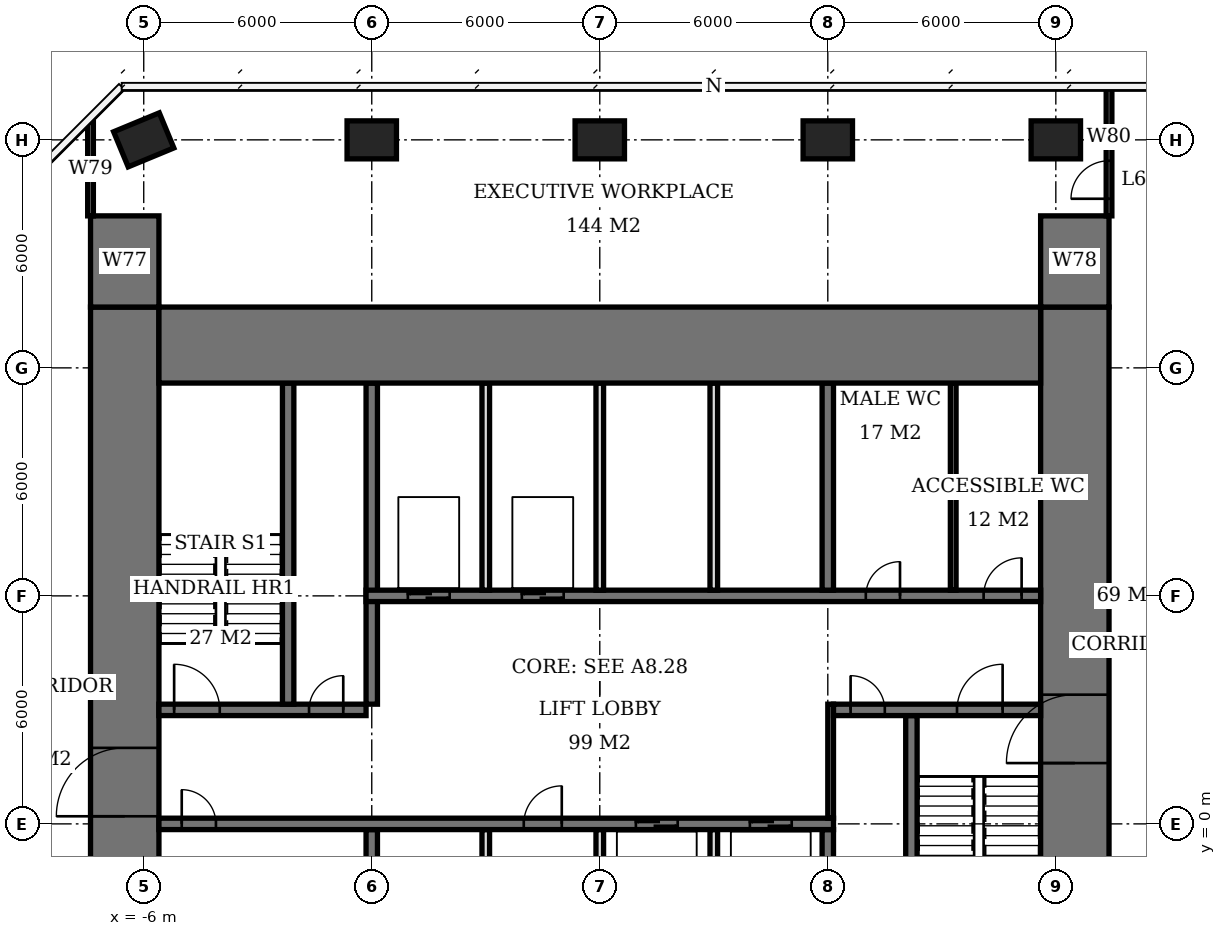
"""IFC4 building model, lengths in metres.
Left out: names, types, materials, properties, quantities, classifications, styles, units other than length and angle.
Written with IfcOpenShell. Run it as: python <this file> out.ifc"""

import sys

from ifc_helpers import new_model, si_unit, direction, frame, frame_2d, origin, origin_2d, place, context, subcontext, project, spatial, rectangle, extrude, element, fill, save


model = new_model("IFC4")
c1 = context("Model", 3, precision=1e-05, world=origin(), true_north=direction((0.0, 1.0)))
c2 = subcontext(c1, "Body", "Model", "MODEL_VIEW")
j1 = project(units=[si_unit("LENGTHUNIT", "METRE"), si_unit("PLANEANGLEUNIT", "RADIAN")], contexts=[c1])
p1 = place(None, origin())
s1 = spatial("IfcSite", under=j1, at=p1, CompositionType="ELEMENT")
p2 = place(p1, origin())
s2 = spatial("IfcBuilding", under=s1, at=p2, CompositionType="ELEMENT")
p3 = place(p2, frame((0.0, 0.0, 272.3)))
s3 = spatial("IfcBuildingStorey", under=s2, at=p3, CompositionType="ELEMENT", Elevation=272.3)
for number, where, z_axis, x_axis in (
    (1, (-6.0, 18.0, 0.0), (0.0, 0.0, 1.0), (0.924, 0.383, 0.0)),
    (2, (0.0, 18.0, 0.0), (0.0, 0.0, 1.0), (1.0, 0.0, 0.0)),
    (3, (6.0, 18.0, 0.0), (0.0, 0.0, 1.0), (1.0, 0.0, 0.0)),
    (4, (12.0, 18.0, 0.0), (0.0, 0.0, 1.0), (1.0, 0.0, 0.0)),
    (5, (18.0, 18.0, 0.0), (0.0, 0.0, 1.0), (1.0, 0.0, 0.0)),
):
    element("IfcColumn", number, at=place(p3, frame(where, z_axis=z_axis, x_axis=x_axis)), inside=s3, PredefinedType="COLUMN", context=c2, shape_type="SweptSolid", body=[
        extrude(rectangle(XDim=1.3, YDim=1.0, at=origin_2d()), origin(), (0.0, 0.0, 1.0), 3.9),
    ])
p4 = place(p3, frame((-5.6, 12.6, 0.0), z_axis=(0.0, 0.0, 1.0), x_axis=(1.0, 0.0, 0.0)))
e6 = element("IfcWall", 6, at=p4, inside=s3, PredefinedType="SHEAR", context=c2, shape_type="SweptSolid", body=[
    extrude(rectangle(XDim=23.2, YDim=2.0, at=frame_2d((11.6, 0.0))), origin(), (0.0, 0.0, 1.0), 3.9),
])
p5 = place(p3, frame((-6.5, -7.6, 0.0), z_axis=(0.0, 0.0, 1.0), x_axis=(0.0, 1.0, 0.0)))
e7 = element("IfcWall", 7, at=p5, inside=s3, PredefinedType="SHEAR", context=c2, shape_type="SweptSolid", body=[
    extrude(rectangle(XDim=21.2, YDim=1.8, at=frame_2d((10.6, 0.0))), origin(), (0.0, 0.0, 1.0), 3.9),
])
p6 = place(p5, frame((7.8, 0.0, 0.0)))
e8 = element("IfcOpeningElement", 8, at=p6, cuts=e7, PredefinedType="OPENING", context=c2, shape_type="SweptSolid", body=[
    extrude(rectangle(XDim=1.8, YDim=2.4, at=frame_2d((0.9, 1.2))), frame((0.0, 0.91, 0.0), z_axis=(0.0, -1.0, 0.0), x_axis=(1.0, 0.0, 0.0)), (0.0, 0.0, 1.0), 1.82),
])
p7 = place(p3, frame((18.5, -7.6, 0.0), z_axis=(0.0, 0.0, 1.0), x_axis=(0.0, 1.0, 0.0)))
e9 = element("IfcWall", 9, at=p7, inside=s3, PredefinedType="SHEAR", context=c2, shape_type="SweptSolid", body=[
    extrude(rectangle(XDim=21.2, YDim=1.8, at=frame_2d((10.6, 0.0))), origin(), (0.0, 0.0, 1.0), 3.9),
])
p8 = place(p7, frame((9.2, 0.0, 0.0)))
e10 = element("IfcOpeningElement", 10, at=p8, cuts=e9, PredefinedType="OPENING", context=c2, shape_type="SweptSolid", body=[
    extrude(rectangle(XDim=1.8, YDim=2.4, at=frame_2d((0.9, 1.2))), frame((0.0, 0.91, 0.0), z_axis=(0.0, -1.0, 0.0), x_axis=(1.0, 0.0, 0.0)), (0.0, 0.0, 1.0), 1.82),
])
for number, where, z_axis, x_axis in (
    (11, (-6.5, 13.6, 0.0), (0.0, 0.0, 1.0), (0.0, 1.0, 0.0)),
    (12, (18.5, 13.6, 0.0), (0.0, 0.0, 1.0), (0.0, 1.0, 0.0)),
):
    element("IfcWall", number, at=place(p3, frame(where, z_axis=z_axis, x_axis=x_axis)), inside=s3, PredefinedType="SHEAR", context=c2, shape_type="SweptSolid", body=[
        extrude(rectangle(XDim=2.4, YDim=1.8, at=frame_2d((1.2, 0.0))), origin(), (0.0, 0.0, 1.0), 3.9),
    ])
p9 = place(p3, frame((-5.6, 0.0, 0.0), z_axis=(0.0, 0.0, 1.0), x_axis=(1.0, 0.0, 0.0)))
e13 = element("IfcWall", 13, at=p9, inside=s3, PredefinedType="SHEAR", context=c2, shape_type="SweptSolid", body=[
    extrude(rectangle(XDim=17.75, YDim=0.3, at=frame_2d((8.875, 0.0))), origin(), (0.0, 0.0, 1.0), 3.9),
])
p10 = place(p9, frame((0.6, 0.0, 0.0)))
e14 = element("IfcOpeningElement", 14, at=p10, cuts=e13, PredefinedType="OPENING", context=c2, shape_type="SweptSolid", body=[
    extrude(rectangle(XDim=0.9, YDim=2.1, at=frame_2d((0.45, 1.05))), frame((0.0, 0.16, 0.0), z_axis=(0.0, -1.0, 0.0), x_axis=(1.0, 0.0, 0.0)), (0.0, 0.0, 1.0), 0.32),
])
p11 = place(p9, frame((9.6, 0.0, 0.0)))
e15 = element("IfcOpeningElement", 15, at=p11, cuts=e13, PredefinedType="OPENING", context=c2, shape_type="SweptSolid", body=[
    extrude(rectangle(XDim=1.0, YDim=2.1, at=frame_2d((0.5, 1.05))), frame((0.0, 0.16, 0.0), z_axis=(0.0, -1.0, 0.0), x_axis=(1.0, 0.0, 0.0)), (0.0, 0.0, 1.0), 0.32),
])
p12 = place(p9, frame((12.55, 0.0, 0.0)))
e16 = element("IfcOpeningElement", 16, at=p12, cuts=e13, PredefinedType="OPENING", context=c2, shape_type="SweptSolid", body=[
    extrude(rectangle(XDim=1.1, YDim=2.1, at=frame_2d((0.55, 1.05))), frame((0.0, 0.16, 0.0), z_axis=(0.0, -1.0, 0.0), x_axis=(1.0, 0.0, 0.0)), (0.0, 0.0, 1.0), 0.32),
])
p13 = place(p9, frame((15.55, 0.0, 0.0)))
e17 = element("IfcOpeningElement", 17, at=p13, cuts=e13, PredefinedType="OPENING", context=c2, shape_type="SweptSolid", body=[
    extrude(rectangle(XDim=1.1, YDim=2.1, at=frame_2d((0.55, 1.05))), frame((0.0, 0.16, 0.0), z_axis=(0.0, -1.0, 0.0), x_axis=(1.0, 0.0, 0.0)), (0.0, 0.0, 1.0), 0.32),
])
p14 = place(p3, frame((-5.6, 3.0, 0.0), z_axis=(0.0, 0.0, 1.0), x_axis=(1.0, 0.0, 0.0)))
e18 = element("IfcWall", 18, at=p14, inside=s3, PredefinedType="SHEAR", context=c2, shape_type="SweptSolid", body=[
    extrude(rectangle(XDim=5.45, YDim=0.3, at=frame_2d((2.725, 0.0))), origin(), (0.0, 0.0, 1.0), 3.9),
])
p15 = place(p14, frame((0.4, 0.0, 0.0)))
e19 = element("IfcOpeningElement", 19, at=p15, cuts=e18, PredefinedType="OPENING", context=c2, shape_type="SweptSolid", body=[
    extrude(rectangle(XDim=1.2, YDim=2.1, at=frame_2d((0.6, 1.05))), frame((0.0, 0.16, 0.0), z_axis=(0.0, -1.0, 0.0), x_axis=(1.0, 0.0, 0.0)), (0.0, 0.0, 1.0), 0.32),
])
p16 = place(p14, frame((3.95, 0.0, 0.0)))
e20 = element("IfcOpeningElement", 20, at=p16, cuts=e18, PredefinedType="OPENING", context=c2, shape_type="SweptSolid", body=[
    extrude(rectangle(XDim=0.9, YDim=2.1, at=frame_2d((0.45, 1.05))), frame((0.0, 0.16, 0.0), z_axis=(0.0, -1.0, 0.0), x_axis=(1.0, 0.0, 0.0)), (0.0, 0.0, 1.0), 0.32),
])
p17 = place(p3, frame((12.15, 3.0, 0.0), z_axis=(0.0, 0.0, 1.0), x_axis=(1.0, 0.0, 0.0)))
e21 = element("IfcWall", 21, at=p17, inside=s3, PredefinedType="SHEAR", context=c2, shape_type="SweptSolid", body=[
    extrude(rectangle(XDim=5.45, YDim=0.3, at=frame_2d((2.725, 0.0))), origin(), (0.0, 0.0, 1.0), 3.9),
])
p18 = place(p17, frame((3.25, 0.0, 0.0)))
e22 = element("IfcOpeningElement", 22, at=p18, cuts=e21, PredefinedType="OPENING", context=c2, shape_type="SweptSolid", body=[
    extrude(rectangle(XDim=1.2, YDim=2.1, at=frame_2d((0.6, 1.05))), frame((0.0, 0.16, 0.0), z_axis=(0.0, -1.0, 0.0), x_axis=(1.0, 0.0, 0.0)), (0.0, 0.0, 1.0), 0.32),
])
p19 = place(p17, frame((0.45, 0.0, 0.0)))
e23 = element("IfcOpeningElement", 23, at=p19, cuts=e21, PredefinedType="OPENING", context=c2, shape_type="SweptSolid", body=[
    extrude(rectangle(XDim=0.9, YDim=2.1, at=frame_2d((0.45, 1.05))), frame((0.0, 0.16, 0.0), z_axis=(0.0, -1.0, 0.0), x_axis=(1.0, 0.0, 0.0)), (0.0, 0.0, 1.0), 0.32),
])
p20 = place(p3, frame((-0.15, 6.0, 0.0), z_axis=(0.0, 0.0, 1.0), x_axis=(1.0, 0.0, 0.0)))
e24 = element("IfcWall", 24, at=p20, inside=s3, PredefinedType="SHEAR", context=c2, shape_type="SweptSolid", body=[
    extrude(rectangle(XDim=17.75, YDim=0.3, at=frame_2d((8.875, 0.0))), origin(), (0.0, 0.0, 1.0), 3.9),
])
p21 = place(p20, frame((13.15, 0.0, 0.0)))
e25 = element("IfcOpeningElement", 25, at=p21, cuts=e24, PredefinedType="OPENING", context=c2, shape_type="SweptSolid", body=[
    extrude(rectangle(XDim=0.9, YDim=2.1, at=frame_2d((0.45, 1.05))), frame((0.0, 0.16, 0.0), z_axis=(0.0, -1.0, 0.0), x_axis=(1.0, 0.0, 0.0)), (0.0, 0.0, 1.0), 0.32),
])
p22 = place(p20, frame((16.25, 0.0, 0.0)))
e26 = element("IfcOpeningElement", 26, at=p22, cuts=e24, PredefinedType="OPENING", context=c2, shape_type="SweptSolid", body=[
    extrude(rectangle(XDim=1.0, YDim=2.1, at=frame_2d((0.5, 1.05))), frame((0.0, 0.16, 0.0), z_axis=(0.0, -1.0, 0.0), x_axis=(1.0, 0.0, 0.0)), (0.0, 0.0, 1.0), 0.32),
])
p23 = place(p20, frame((1.1, 0.0, 0.0)))
e27 = element("IfcOpeningElement", 27, at=p23, cuts=e24, PredefinedType="OPENING", context=c2, shape_type="SweptSolid", body=[
    extrude(rectangle(XDim=1.1, YDim=2.1, at=frame_2d((0.55, 1.05))), frame((0.0, 0.16, 0.0), z_axis=(0.0, -1.0, 0.0), x_axis=(1.0, 0.0, 0.0)), (0.0, 0.0, 1.0), 0.32),
])
p24 = place(p20, frame((4.1, 0.0, 0.0)))
e28 = element("IfcOpeningElement", 28, at=p24, cuts=e24, PredefinedType="OPENING", context=c2, shape_type="SweptSolid", body=[
    extrude(rectangle(XDim=1.1, YDim=2.1, at=frame_2d((0.55, 1.05))), frame((0.0, 0.16, 0.0), z_axis=(0.0, -1.0, 0.0), x_axis=(1.0, 0.0, 0.0)), (0.0, 0.0, 1.0), 0.32),
])
p25 = place(p3, frame((0.0, -5.6, 0.0), z_axis=(0.0, 0.0, 1.0), x_axis=(0.0, 1.0, 0.0)))
e29 = element("IfcWall", 29, at=p25, inside=s3, PredefinedType="SHEAR", context=c2, shape_type="SweptSolid", body=[
    extrude(rectangle(XDim=5.45, YDim=0.3, at=frame_2d((2.725, 0.0))), origin(), (0.0, 0.0, 1.0), 3.9),
])
p26 = place(p3, frame((0.0, 3.15, 0.0), z_axis=(0.0, 0.0, 1.0), x_axis=(0.0, 1.0, 0.0)))
e30 = element("IfcWall", 30, at=p26, inside=s3, PredefinedType="SHEAR", context=c2, shape_type="SweptSolid", body=[
    extrude(rectangle(XDim=8.45, YDim=0.3, at=frame_2d((4.225, 0.0))), origin(), (0.0, 0.0, 1.0), 3.9),
])
for number, where, z_axis, x_axis in (
    (31, (12.0, -5.6, 0.0), (0.0, 0.0, 1.0), (0.0, 1.0, 0.0)),
    (32, (12.0, 6.15, 0.0), (0.0, 0.0, 1.0), (0.0, 1.0, 0.0)),
):
    element("IfcWall", number, at=place(p3, frame(where, z_axis=z_axis, x_axis=x_axis)), inside=s3, PredefinedType="SHEAR", context=c2, shape_type="SweptSolid", body=[
        extrude(rectangle(XDim=5.45, YDim=0.3, at=frame_2d((2.725, 0.0))), origin(), (0.0, 0.0, 1.0), 3.9),
    ])
for number, where, z_axis, x_axis in (
    (33, (-2.2, 3.15, 0.0), (0.0, 0.0, 1.0), (0.0, 1.0, 0.0)),
    (34, (14.2, -5.6, 0.0), (0.0, 0.0, 1.0), (0.0, 1.0, 0.0)),
):
    element("IfcWall", number, at=place(p3, frame(where, z_axis=z_axis, x_axis=x_axis)), inside=s3, PredefinedType="SHEAR", context=c2, shape_type="SweptSolid", body=[
        extrude(rectangle(XDim=8.45, YDim=0.3, at=frame_2d((4.225, 0.0))), origin(), (0.0, 0.0, 1.0), 3.9),
    ])
for number, where, z_axis, x_axis in (
    (35, (3.0, 6.15, 0.0), (0.0, 0.0, 1.0), (0.0, 1.0, 0.0)),
    (36, (6.0, 6.15, 0.0), (0.0, 0.0, 1.0), (0.0, 1.0, 0.0)),
    (37, (9.0, 6.15, 0.0), (0.0, 0.0, 1.0), (0.0, 1.0, 0.0)),
    (38, (3.0, -5.6, 0.0), (0.0, 0.0, 1.0), (0.0, 1.0, 0.0)),
    (39, (6.0, -5.6, 0.0), (0.0, 0.0, 1.0), (0.0, 1.0, 0.0)),
    (40, (9.0, -5.6, 0.0), (0.0, 0.0, 1.0), (0.0, 1.0, 0.0)),
):
    element("IfcWall", number, at=place(p3, frame(where, z_axis=z_axis, x_axis=x_axis)), inside=s3, PredefinedType="SOLIDWALL", context=c2, shape_type="SweptSolid", body=[
        extrude(rectangle(XDim=5.45, YDim=0.2, at=frame_2d((2.725, 0.0))), origin(), (0.0, 0.0, 1.0), 3.9),
    ])
p27 = place(p3, frame((15.3, 6.15, 0.0), z_axis=(0.0, 0.0, 1.0), x_axis=(0.0, 1.0, 0.0)))
e41 = element("IfcWall", 41, at=p27, inside=s3, PredefinedType="PLUMBINGWALL", context=c2, shape_type="SweptSolid", body=[
    extrude(rectangle(XDim=5.45, YDim=0.15, at=frame_2d((2.725, 0.0))), origin(), (0.0, 0.0, 1.0), 3.65),
])
p28 = place(p3, frame((-7.4, 16.0, 0.0), z_axis=(0.0, 0.0, 1.0), x_axis=(0.0, 1.0, 0.0)))
e42 = element("IfcWall", 42, at=p28, inside=s3, PredefinedType="PARTITIONING", context=c2, shape_type="SweptSolid", body=[
    extrude(rectangle(XDim=2.464, YDim=0.15, at=frame_2d((1.232, 0.0))), origin(), (0.0, 0.0, 1.0), 3.65),
])
p29 = place(p3, frame((19.4, 16.0, 0.0), z_axis=(0.0, 0.0, 1.0), x_axis=(0.0, 1.0, 0.0)))
e43 = element("IfcWall", 43, at=p29, inside=s3, PredefinedType="PARTITIONING", context=c2, shape_type="SweptSolid", body=[
    extrude(rectangle(XDim=3.375, YDim=0.15, at=frame_2d((1.688, 0.0))), origin(), (0.0, 0.0, 1.0), 3.65),
])
p30 = place(p29, frame((0.45, 0.0, 0.0)))
e44 = element("IfcOpeningElement", 44, at=p30, cuts=e43, PredefinedType="OPENING", context=c2, shape_type="SweptSolid", body=[
    extrude(rectangle(XDim=1.0, YDim=2.1, at=frame_2d((0.5, 1.05))), frame((0.0, 0.085, 0.0), z_axis=(0.0, -1.0, 0.0), x_axis=(1.0, 0.0, 0.0)), (0.0, 0.0, 1.0), 0.17),
])
p31 = place(p3, frame((12.075, 0.15, 0.0), z_axis=(0.0, 0.0, 1.0), x_axis=(0.0, 1.0, 0.0)))
e45 = element("IfcWall", 45, at=p31, inside=s3, PredefinedType="PARTITIONING", context=c2, shape_type="SweptSolid", body=[
    extrude(rectangle(XDim=3.0, YDim=0.15, at=frame_2d((1.5, 0.0))), origin(), (0.0, 0.0, 1.0), 3.65),
])
p32 = place(p6, origin())
e46 = element("IfcDoor", 46, at=p32, inside=s3, OperationType="DOUBLE_DOOR_SINGLE_SWING", PredefinedType="DOOR", context=c2, shape_type="SweptSolid", body=[
    extrude(rectangle(XDim=1.8, YDim=2.4, at=frame_2d((0.9, 1.2))), frame((0.0, 0.025, 0.0), z_axis=(0.0, -1.0, 0.0), x_axis=(1.0, 0.0, 0.0)), (0.0, 0.0, 1.0), 0.05),
])
fill(e8, e46)
p33 = place(p8, origin())
e47 = element("IfcDoor", 47, at=p33, inside=s3, OperationType="DOUBLE_DOOR_SINGLE_SWING", PredefinedType="DOOR", context=c2, shape_type="SweptSolid", body=[
    extrude(rectangle(XDim=1.8, YDim=2.4, at=frame_2d((0.9, 1.2))), frame((0.0, 0.025, 0.0), z_axis=(0.0, -1.0, 0.0), x_axis=(1.0, 0.0, 0.0)), (0.0, 0.0, 1.0), 0.05),
])
fill(e10, e47)
p34 = place(p15, origin())
e48 = element("IfcDoor", 48, at=p34, inside=s3, OperationType="SINGLE_SWING_LEFT", PredefinedType="DOOR", context=c2, shape_type="SweptSolid", body=[
    extrude(rectangle(XDim=1.2, YDim=2.1, at=frame_2d((0.6, 1.05))), frame((0.0, 0.025, 0.0), z_axis=(0.0, -1.0, 0.0), x_axis=(1.0, 0.0, 0.0)), (0.0, 0.0, 1.0), 0.05),
])
fill(e19, e48)
p35 = place(p16, origin())
e49 = element("IfcDoor", 49, at=p35, inside=s3, OperationType="SINGLE_SWING_RIGHT", PredefinedType="DOOR", context=c2, shape_type="SweptSolid", body=[
    extrude(rectangle(XDim=0.9, YDim=2.1, at=frame_2d((0.45, 1.05))), frame((0.0, 0.025, 0.0), z_axis=(0.0, -1.0, 0.0), x_axis=(1.0, 0.0, 0.0)), (0.0, 0.0, 1.0), 0.05),
])
fill(e20, e49)
p36 = place(p18, origin())
e50 = element("IfcDoor", 50, at=p36, inside=s3, OperationType="SINGLE_SWING_RIGHT", PredefinedType="DOOR", context=c2, shape_type="SweptSolid", body=[
    extrude(rectangle(XDim=1.2, YDim=2.1, at=frame_2d((0.6, 1.05))), frame((0.0, 0.025, 0.0), z_axis=(0.0, -1.0, 0.0), x_axis=(1.0, 0.0, 0.0)), (0.0, 0.0, 1.0), 0.05),
])
fill(e22, e50)
p37 = place(p19, origin())
e51 = element("IfcDoor", 51, at=p37, inside=s3, OperationType="SINGLE_SWING_LEFT", PredefinedType="DOOR", context=c2, shape_type="SweptSolid", body=[
    extrude(rectangle(XDim=0.9, YDim=2.1, at=frame_2d((0.45, 1.05))), frame((0.0, 0.025, 0.0), z_axis=(0.0, -1.0, 0.0), x_axis=(1.0, 0.0, 0.0)), (0.0, 0.0, 1.0), 0.05),
])
fill(e23, e51)
p38 = place(p10, origin())
e52 = element("IfcDoor", 52, at=p38, inside=s3, OperationType="SINGLE_SWING_LEFT", PredefinedType="DOOR", context=c2, shape_type="SweptSolid", body=[
    extrude(rectangle(XDim=0.9, YDim=2.1, at=frame_2d((0.45, 1.05))), frame((0.0, 0.025, 0.0), z_axis=(0.0, -1.0, 0.0), x_axis=(1.0, 0.0, 0.0)), (0.0, 0.0, 1.0), 0.05),
])
fill(e14, e52)
p39 = place(p21, origin())
e53 = element("IfcDoor", 53, at=p39, inside=s3, OperationType="SINGLE_SWING_RIGHT", PredefinedType="DOOR", context=c2, shape_type="SweptSolid", body=[
    extrude(rectangle(XDim=0.9, YDim=2.1, at=frame_2d((0.45, 1.05))), frame((0.0, 0.025, 0.0), z_axis=(0.0, -1.0, 0.0), x_axis=(1.0, 0.0, 0.0)), (0.0, 0.0, 1.0), 0.05),
])
fill(e25, e53)
p40 = place(p22, origin())
e54 = element("IfcDoor", 54, at=p40, inside=s3, OperationType="SINGLE_SWING_RIGHT", PredefinedType="DOOR", context=c2, shape_type="SweptSolid", body=[
    extrude(rectangle(XDim=1.0, YDim=2.1, at=frame_2d((0.5, 1.05))), frame((0.0, 0.025, 0.0), z_axis=(0.0, -1.0, 0.0), x_axis=(1.0, 0.0, 0.0)), (0.0, 0.0, 1.0), 0.05),
])
fill(e26, e54)
p41 = place(p11, origin())
e55 = element("IfcDoor", 55, at=p41, inside=s3, OperationType="SINGLE_SWING_RIGHT", PredefinedType="DOOR", context=c2, shape_type="SweptSolid", body=[
    extrude(rectangle(XDim=1.0, YDim=2.1, at=frame_2d((0.5, 1.05))), frame((0.0, 0.025, 0.0), z_axis=(0.0, -1.0, 0.0), x_axis=(1.0, 0.0, 0.0)), (0.0, 0.0, 1.0), 0.05),
])
fill(e15, e55)
p42 = place(p23, origin())
e56 = element("IfcDoor", 56, at=p42, inside=s3, OperationType="DOUBLE_DOOR_SLIDING", PredefinedType="USERDEFINED", context=c2, shape_type="SweptSolid", body=[
    extrude(rectangle(XDim=1.1, YDim=2.1, at=frame_2d((0.55, 1.05))), frame((0.0, 0.025, 0.0), z_axis=(0.0, -1.0, 0.0), x_axis=(1.0, 0.0, 0.0)), (0.0, 0.0, 1.0), 0.05),
])
fill(e27, e56)
p43 = place(p24, origin())
e57 = element("IfcDoor", 57, at=p43, inside=s3, OperationType="DOUBLE_DOOR_SLIDING", PredefinedType="USERDEFINED", context=c2, shape_type="SweptSolid", body=[
    extrude(rectangle(XDim=1.1, YDim=2.1, at=frame_2d((0.55, 1.05))), frame((0.0, 0.025, 0.0), z_axis=(0.0, -1.0, 0.0), x_axis=(1.0, 0.0, 0.0)), (0.0, 0.0, 1.0), 0.05),
])
fill(e28, e57)
p44 = place(p12, origin())
e58 = element("IfcDoor", 58, at=p44, inside=s3, OperationType="DOUBLE_DOOR_SLIDING", PredefinedType="USERDEFINED", context=c2, shape_type="SweptSolid", body=[
    extrude(rectangle(XDim=1.1, YDim=2.1, at=frame_2d((0.55, 1.05))), frame((0.0, 0.025, 0.0), z_axis=(0.0, -1.0, 0.0), x_axis=(1.0, 0.0, 0.0)), (0.0, 0.0, 1.0), 0.05),
])
fill(e16, e58)
p45 = place(p13, origin())
e59 = element("IfcDoor", 59, at=p45, inside=s3, OperationType="DOUBLE_DOOR_SLIDING", PredefinedType="USERDEFINED", context=c2, shape_type="SweptSolid", body=[
    extrude(rectangle(XDim=1.1, YDim=2.1, at=frame_2d((0.55, 1.05))), frame((0.0, 0.025, 0.0), z_axis=(0.0, -1.0, 0.0), x_axis=(1.0, 0.0, 0.0)), (0.0, 0.0, 1.0), 0.05),
])
fill(e17, e59)
p46 = place(p30, origin())
e60 = element("IfcDoor", 60, at=p46, inside=s3, OperationType="SINGLE_SWING_LEFT", PredefinedType="DOOR", context=c2, shape_type="SweptSolid", body=[
    extrude(rectangle(XDim=1.0, YDim=2.1, at=frame_2d((0.5, 1.05))), frame((0.0, 0.025, 0.0), z_axis=(0.0, -1.0, 0.0), x_axis=(1.0, 0.0, 0.0)), (0.0, 0.0, 1.0), 0.05),
])
fill(e44, e60)
save(model, sys.argv[1])
